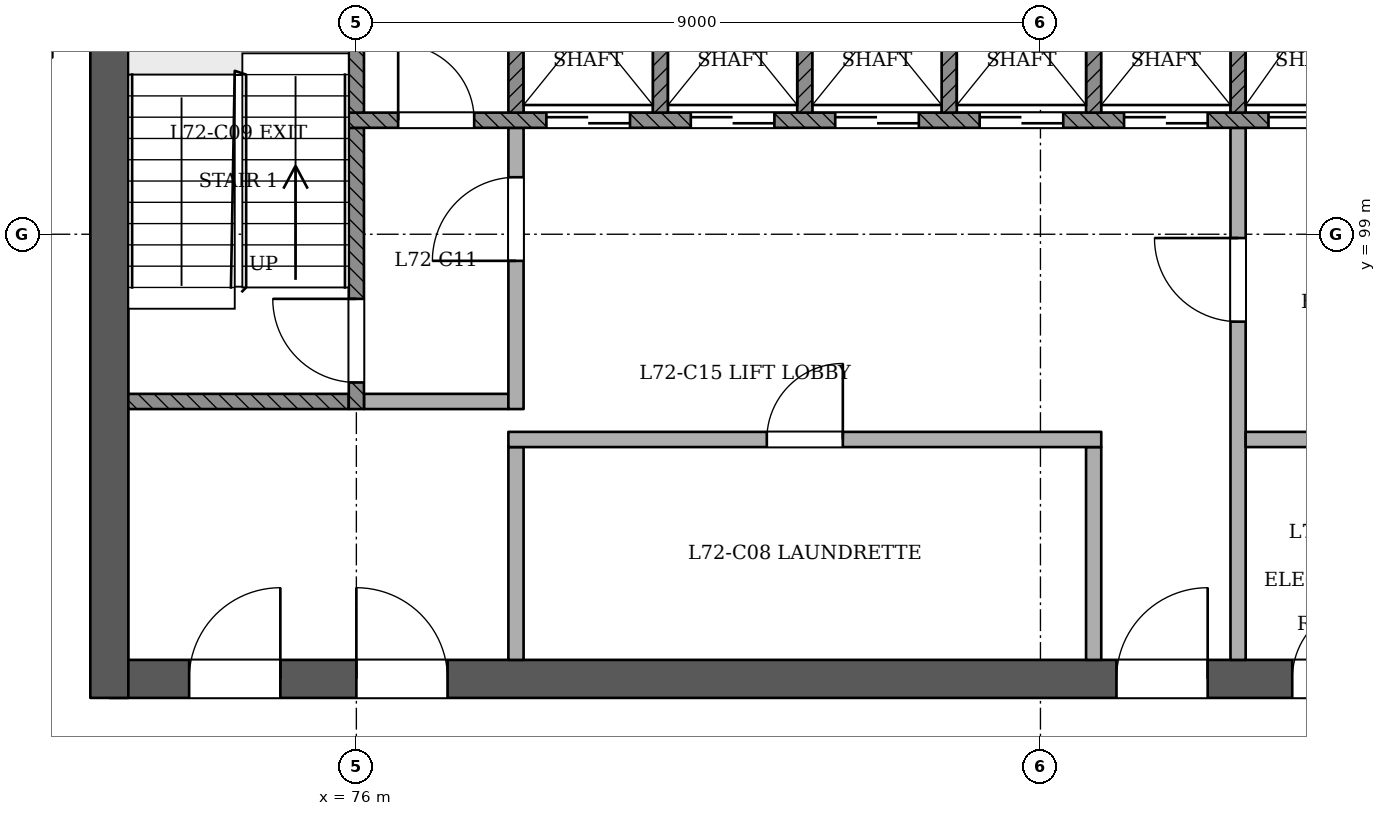
"""IFC4 building model, lengths in metres.
Left out: names, types, materials, properties, quantities, classifications, styles, units other than length and angle.
Written with IfcOpenShell. Run it as: python <this file> out.ifc"""

import sys

from ifc_helpers import new_model, si_unit, direction, frame, frame_2d, origin, place, context, subcontext, project, spatial, rectangle, extrude, element, fill, save


model = new_model("IFC4")
c1 = context("Model", 3, precision=1e-05, world=origin(), true_north=direction((0.0, 1.0)))
c2 = subcontext(c1, "Body", "Model", "MODEL_VIEW")
j1 = project(units=[si_unit("LENGTHUNIT", "METRE"), si_unit("PLANEANGLEUNIT", "RADIAN")], contexts=[c1])
p1 = place(None, origin())
s1 = spatial("IfcSite", under=j1, at=p1, CompositionType="ELEMENT")
p2 = place(p1, origin())
s2 = spatial("IfcBuilding", under=s1, at=p2, CompositionType="ELEMENT")
p3 = place(p2, frame((0.0, 0.0, 278.8)))
s3 = spatial("IfcBuildingStorey", under=s2, at=p3, CompositionType="ELEMENT", Elevation=278.8)
p4 = place(p3, frame((72.75, 93.15, 0.0), z_axis=(0.0, 0.0, 1.0), x_axis=(1.0, 0.0, 0.0)))
e1 = element("IfcWall", 1, at=p4, inside=s3, PredefinedType="SHEAR", context=c2, shape_type="SweptSolid", body=[
    extrude(rectangle(XDim=24.75, YDim=0.5, at=frame_2d((12.375, 0.0))), origin(), (0.0, 0.0, 1.0), 3.6),
])
p5 = place(p4, frame((1.05, 0.0, 0.0)))
e2 = element("IfcOpeningElement", 2, at=p5, cuts=e1, PredefinedType="OPENING", context=c2, shape_type="SweptSolid", body=[
    extrude(rectangle(XDim=1.2, YDim=2.1, at=frame_2d((0.6, 1.05))), frame((0.0, 0.26, 0.0), z_axis=(0.0, -1.0, 0.0), x_axis=(1.0, 0.0, 0.0)), (0.0, 0.0, 1.0), 0.521),
])
p6 = place(p4, frame((3.25, 0.0, 0.0)))
e3 = element("IfcOpeningElement", 3, at=p6, cuts=e1, PredefinedType="OPENING", context=c2, shape_type="SweptSolid", body=[
    extrude(rectangle(XDim=1.2, YDim=2.1, at=frame_2d((0.6, 1.05))), frame((0.0, 0.26, 0.0), z_axis=(0.0, -1.0, 0.0), x_axis=(1.0, 0.0, 0.0)), (0.0, 0.0, 1.0), 0.521),
])
p7 = place(p4, frame((13.25, 0.0, 0.0)))
e4 = element("IfcOpeningElement", 4, at=p7, cuts=e1, PredefinedType="OPENING", context=c2, shape_type="SweptSolid", body=[
    extrude(rectangle(XDim=1.2, YDim=2.1, at=frame_2d((0.6, 1.05))), frame((0.0, 0.26, 0.0), z_axis=(0.0, -1.0, 0.0), x_axis=(1.0, 0.0, 0.0)), (0.0, 0.0, 1.0), 0.521),
])
p8 = place(p4, frame((15.562, 0.0, 0.0)))
e5 = element("IfcOpeningElement", 5, at=p8, cuts=e1, PredefinedType="OPENING", context=c2, shape_type="SweptSolid", body=[
    extrude(rectangle(XDim=1.0, YDim=2.1, at=frame_2d((0.5, 1.05))), frame((0.0, 0.26, 0.0), z_axis=(0.0, -1.0, 0.0), x_axis=(1.0, 0.0, 0.0)), (0.0, 0.0, 1.0), 0.521),
])
p9 = place(p4, frame((19.0, 0.0, 0.0)))
e6 = element("IfcOpeningElement", 6, at=p9, cuts=e1, PredefinedType="OPENING", context=c2, shape_type="SweptSolid", body=[
    extrude(rectangle(XDim=1.0, YDim=2.1, at=frame_2d((0.5, 1.05))), frame((0.0, 0.26, 0.0), z_axis=(0.0, -1.0, 0.0), x_axis=(1.0, 0.0, 0.0)), (0.0, 0.0, 1.0), 0.521),
])
p10 = place(p4, frame((22.538, 0.0, 0.0)))
e7 = element("IfcOpeningElement", 7, at=p10, cuts=e1, PredefinedType="OPENING", context=c2, shape_type="SweptSolid", body=[
    extrude(rectangle(XDim=1.0, YDim=2.1, at=frame_2d((0.5, 1.05))), frame((0.0, 0.26, 0.0), z_axis=(0.0, -1.0, 0.0), x_axis=(1.0, 0.0, 0.0)), (0.0, 0.0, 1.0), 0.521),
])
p11 = place(p3, frame((72.75, 103.65, 0.0), z_axis=(0.0, 0.0, 1.0), x_axis=(0.0, -1.0, 0.0)))
e8 = element("IfcWall", 8, at=p11, inside=s3, PredefinedType="SHEAR", context=c2, shape_type="SweptSolid", body=[
    extrude(rectangle(XDim=10.75, YDim=0.5, at=frame_2d((5.375, 0.0))), origin(), (0.0, 0.0, 1.0), 3.6),
])
p12 = place(p3, frame((72.0, 101.4, 0.0), z_axis=(0.0, 0.0, 1.0), x_axis=(-1.0, 0.0, 0.0)))
e9 = element("IfcWall", 9, at=p12, inside=s3, PredefinedType="PARTITIONING", context=c2, shape_type="SweptSolid", body=[
    extrude(rectangle(XDim=1.8, YDim=0.15, at=frame_2d((0.9, 0.0))), origin(), (0.0, 0.0, 1.0), 3.2),
])
p13 = place(p12, frame((0.504, 0.0, 0.0)))
e10 = element("IfcOpeningElement", 10, at=p13, cuts=e9, PredefinedType="OPENING", context=c2, shape_type="SweptSolid", body=[
    extrude(rectangle(XDim=1.0, YDim=2.1, at=frame_2d((0.5, 1.05))), frame((0.0, 0.085, 0.0), z_axis=(0.0, -1.0, 0.0), x_axis=(1.0, 0.0, 0.0)), (0.0, 0.0, 1.0), 0.171),
])
for number, where, z_axis, x_axis in (
    (11, (78.1, 93.4, 0.0), (0.0, 0.0, 1.0), (0.0, 1.0, 0.0)),
    (12, (85.7, 93.4, 0.0), (0.0, 0.0, 1.0), (0.0, 1.0, 0.0)),
):
    element("IfcWall", number, at=place(p3, frame(where, z_axis=z_axis, x_axis=x_axis)), inside=s3, PredefinedType="PARTITIONING", context=c2, shape_type="SweptSolid", body=[
        extrude(rectangle(XDim=2.8, YDim=0.2, at=frame_2d((1.4, 0.0))), origin(), (0.0, 0.0, 1.0), 3.2),
    ])
p14 = place(p3, frame((87.6, 93.4, 0.0), z_axis=(0.0, 0.0, 1.0), x_axis=(0.0, 1.0, 0.0)))
e13 = element("IfcWall", 13, at=p14, inside=s3, PredefinedType="PARTITIONING", context=c2, shape_type="SweptSolid", body=[
    extrude(rectangle(XDim=7.0, YDim=0.2, at=frame_2d((3.5, 0.0))), origin(), (0.0, 0.0, 1.0), 3.2),
])
p15 = place(p14, frame((4.45, 0.0, 0.0)))
e14 = element("IfcOpeningElement", 14, at=p15, cuts=e13, PredefinedType="OPENING", context=c2, shape_type="SweptSolid", body=[
    extrude(rectangle(XDim=1.1, YDim=2.1, at=frame_2d((0.55, 1.05))), frame((0.0, 0.11, 0.0), z_axis=(0.0, -1.0, 0.0), x_axis=(1.0, 0.0, 0.0)), (0.0, 0.0, 1.0), 0.221),
])
p16 = place(p3, frame((78.0, 96.3, 0.0), z_axis=(0.0, 0.0, 1.0), x_axis=(1.0, 0.0, 0.0)))
e15 = element("IfcWall", 15, at=p16, inside=s3, PredefinedType="PARTITIONING", context=c2, shape_type="SweptSolid", body=[
    extrude(rectangle(XDim=7.8, YDim=0.2, at=frame_2d((3.9, 0.0))), origin(), (0.0, 0.0, 1.0), 3.2),
])
p17 = place(p16, frame((3.4, 0.0, 0.0)))
e16 = element("IfcOpeningElement", 16, at=p17, cuts=e15, PredefinedType="OPENING", context=c2, shape_type="SweptSolid", body=[
    extrude(rectangle(XDim=1.0, YDim=2.1, at=frame_2d((0.5, 1.05))), frame((0.0, 0.11, 0.0), z_axis=(0.0, -1.0, 0.0), x_axis=(1.0, 0.0, 0.0)), (0.0, 0.0, 1.0), 0.221),
])
p18 = place(p3, frame((87.7, 96.3, 0.0), z_axis=(0.0, 0.0, 1.0), x_axis=(1.0, 0.0, 0.0)))
e17 = element("IfcWall", 17, at=p18, inside=s3, PredefinedType="PARTITIONING", context=c2, shape_type="SweptSolid", body=[
    extrude(rectangle(XDim=3.6, YDim=0.2, at=frame_2d((1.8, 0.0))), origin(), (0.0, 0.0, 1.0), 3.2),
])
p19 = place(p3, frame((73.0, 96.8, 0.0), z_axis=(0.0, 0.0, 1.0), x_axis=(1.0, 0.0, 0.0)))
e18 = element("IfcWall", 18, at=p19, inside=s3, PredefinedType="SOLIDWALL", context=c2, shape_type="SweptSolid", body=[
    extrude(rectangle(XDim=2.9, YDim=0.2, at=frame_2d((1.45, 0.0))), origin(), (0.0, 0.0, 1.0), 3.2),
])
p20 = place(p3, frame((76.0, 96.7, 0.0), z_axis=(0.0, 0.0, 1.0), x_axis=(0.0, 1.0, 0.0)))
e19 = element("IfcWall", 19, at=p20, inside=s3, PredefinedType="SOLIDWALL", context=c2, shape_type="SweptSolid", body=[
    extrude(rectangle(XDim=3.7, YDim=0.2, at=frame_2d((1.85, 0.0))), origin(), (0.0, 0.0, 1.0), 3.2),
])
p21 = place(p20, frame((0.35, 0.0, 0.0)))
e20 = element("IfcOpeningElement", 20, at=p21, cuts=e19, PredefinedType="OPENING", context=c2, shape_type="SweptSolid", body=[
    extrude(rectangle(XDim=1.1, YDim=2.1, at=frame_2d((0.55, 1.05))), frame((0.0, 0.11, 0.0), z_axis=(0.0, -1.0, 0.0), x_axis=(1.0, 0.0, 0.0)), (0.0, 0.0, 1.0), 0.221),
])
p22 = place(p3, frame((76.1, 96.8, 0.0), z_axis=(0.0, 0.0, 1.0), x_axis=(1.0, 0.0, 0.0)))
e21 = element("IfcWall", 21, at=p22, inside=s3, PredefinedType="PARTITIONING", context=c2, shape_type="SweptSolid", body=[
    extrude(rectangle(XDim=1.9, YDim=0.2, at=frame_2d((0.95, 0.0))), origin(), (0.0, 0.0, 1.0), 3.2),
])
p23 = place(p3, frame((78.1, 96.7, 0.0), z_axis=(0.0, 0.0, 1.0), x_axis=(0.0, 1.0, 0.0)))
e22 = element("IfcWall", 22, at=p23, inside=s3, PredefinedType="PARTITIONING", context=c2, shape_type="SweptSolid", body=[
    extrude(rectangle(XDim=3.7, YDim=0.2, at=frame_2d((1.85, 0.0))), origin(), (0.0, 0.0, 1.0), 3.2),
])
p24 = place(p23, frame((1.95, 0.0, 0.0)))
e23 = element("IfcOpeningElement", 23, at=p24, cuts=e22, PredefinedType="OPENING", context=c2, shape_type="SweptSolid", body=[
    extrude(rectangle(XDim=1.1, YDim=2.1, at=frame_2d((0.55, 1.05))), frame((0.0, 0.11, 0.0), z_axis=(0.0, -1.0, 0.0), x_axis=(1.0, 0.0, 0.0)), (0.0, 0.0, 1.0), 0.221),
])
p25 = place(p3, frame((75.9, 100.5, 0.0), z_axis=(0.0, 0.0, 1.0), x_axis=(1.0, 0.0, 0.0)))
e24 = element("IfcWall", 24, at=p25, inside=s3, PredefinedType="SOLIDWALL", context=c2, shape_type="SweptSolid", body=[
    extrude(rectangle(XDim=18.2, YDim=0.2, at=frame_2d((9.1, 0.0))), origin(), (0.0, 0.0, 1.0), 3.2),
])
p26 = place(p25, frame((2.6, 0.0, 0.0)))
e25 = element("IfcOpeningElement", 25, at=p26, cuts=e24, PredefinedType="OPENING", context=c2, shape_type="SweptSolid", body=[
    extrude(rectangle(XDim=1.1, YDim=2.1, at=frame_2d((0.55, 1.05))), frame((0.0, 0.11, 0.0), z_axis=(0.0, -1.0, 0.0), x_axis=(1.0, 0.0, 0.0)), (0.0, 0.0, 1.0), 0.221),
])
p27 = place(p25, frame((4.5, 0.0, 0.0)))
e26 = element("IfcOpeningElement", 26, at=p27, cuts=e24, PredefinedType="OPENING", context=c2, shape_type="SweptSolid", body=[
    extrude(rectangle(XDim=1.1, YDim=2.1, at=frame_2d((0.55, 1.05))), frame((0.0, 0.11, 0.0), z_axis=(0.0, -1.0, 0.0), x_axis=(1.0, 0.0, 0.0)), (0.0, 0.0, 1.0), 0.221),
])
p28 = place(p25, frame((6.4, 0.0, 0.0)))
e27 = element("IfcOpeningElement", 27, at=p28, cuts=e24, PredefinedType="OPENING", context=c2, shape_type="SweptSolid", body=[
    extrude(rectangle(XDim=1.1, YDim=2.1, at=frame_2d((0.55, 1.05))), frame((0.0, 0.11, 0.0), z_axis=(0.0, -1.0, 0.0), x_axis=(1.0, 0.0, 0.0)), (0.0, 0.0, 1.0), 0.221),
])
p29 = place(p25, frame((8.3, 0.0, 0.0)))
e28 = element("IfcOpeningElement", 28, at=p29, cuts=e24, PredefinedType="OPENING", context=c2, shape_type="SweptSolid", body=[
    extrude(rectangle(XDim=1.1, YDim=2.1, at=frame_2d((0.55, 1.05))), frame((0.0, 0.11, 0.0), z_axis=(0.0, -1.0, 0.0), x_axis=(1.0, 0.0, 0.0)), (0.0, 0.0, 1.0), 0.221),
])
p30 = place(p25, frame((10.2, 0.0, 0.0)))
e29 = element("IfcOpeningElement", 29, at=p30, cuts=e24, PredefinedType="OPENING", context=c2, shape_type="SweptSolid", body=[
    extrude(rectangle(XDim=1.1, YDim=2.1, at=frame_2d((0.55, 1.05))), frame((0.0, 0.11, 0.0), z_axis=(0.0, -1.0, 0.0), x_axis=(1.0, 0.0, 0.0)), (0.0, 0.0, 1.0), 0.221),
])
p31 = place(p25, frame((12.1, 0.0, 0.0)))
e30 = element("IfcOpeningElement", 30, at=p31, cuts=e24, PredefinedType="OPENING", context=c2, shape_type="SweptSolid", body=[
    extrude(rectangle(XDim=1.1, YDim=2.1, at=frame_2d((0.55, 1.05))), frame((0.0, 0.11, 0.0), z_axis=(0.0, -1.0, 0.0), x_axis=(1.0, 0.0, 0.0)), (0.0, 0.0, 1.0), 0.221),
])
p32 = place(p25, frame((14.0, 0.0, 0.0)))
e31 = element("IfcOpeningElement", 31, at=p32, cuts=e24, PredefinedType="OPENING", context=c2, shape_type="SweptSolid", body=[
    extrude(rectangle(XDim=1.1, YDim=2.1, at=frame_2d((0.55, 1.05))), frame((0.0, 0.11, 0.0), z_axis=(0.0, -1.0, 0.0), x_axis=(1.0, 0.0, 0.0)), (0.0, 0.0, 1.0), 0.221),
])
p33 = place(p25, frame((0.65, 0.0, 0.0)))
e32 = element("IfcOpeningElement", 32, at=p33, cuts=e24, PredefinedType="OPENING", context=c2, shape_type="SweptSolid", body=[
    extrude(rectangle(XDim=1.0, YDim=2.1, at=frame_2d((0.5, 1.05))), frame((0.0, 0.11, 0.0), z_axis=(0.0, -1.0, 0.0), x_axis=(1.0, 0.0, 0.0)), (0.0, 0.0, 1.0), 0.221),
])
p34 = place(p25, frame((16.3, 0.0, 0.0)))
e33 = element("IfcOpeningElement", 33, at=p34, cuts=e24, PredefinedType="OPENING", context=c2, shape_type="SweptSolid", body=[
    extrude(rectangle(XDim=1.0, YDim=2.1, at=frame_2d((0.5, 1.05))), frame((0.0, 0.11, 0.0), z_axis=(0.0, -1.0, 0.0), x_axis=(1.0, 0.0, 0.0)), (0.0, 0.0, 1.0), 0.221),
])
for number, where, z_axis, x_axis in (
    (34, (76.0, 100.6, 0.0), (0.0, 0.0, 1.0), (0.0, 1.0, 0.0)),
    (35, (78.1, 100.6, 0.0), (0.0, 0.0, 1.0), (0.0, 1.0, 0.0)),
    (36, (80.0, 100.6, 0.0), (0.0, 0.0, 1.0), (0.0, 1.0, 0.0)),
    (37, (81.9, 100.6, 0.0), (0.0, 0.0, 1.0), (0.0, 1.0, 0.0)),
    (38, (83.8, 100.6, 0.0), (0.0, 0.0, 1.0), (0.0, 1.0, 0.0)),
    (39, (85.7, 100.6, 0.0), (0.0, 0.0, 1.0), (0.0, 1.0, 0.0)),
    (40, (87.6, 100.6, 0.0), (0.0, 0.0, 1.0), (0.0, 1.0, 0.0)),
):
    element("IfcWall", number, at=place(p3, frame(where, z_axis=z_axis, x_axis=x_axis)), inside=s3, PredefinedType="SOLIDWALL", context=c2, shape_type="SweptSolid", body=[
        extrude(rectangle(XDim=2.8, YDim=0.2, at=frame_2d((1.4, 0.0))), origin(), (0.0, 0.0, 1.0), 3.2),
    ])
p35 = place(p26, origin())
e41 = element("IfcDoor", 41, at=p35, inside=s3, OperationType="SLIDING_TO_RIGHT", PredefinedType="NOTDEFINED", context=c2, shape_type="SweptSolid", body=[
    extrude(rectangle(XDim=1.1, YDim=2.1, at=frame_2d((0.55, 1.05))), frame((0.0, 0.025, 0.0), z_axis=(0.0, -1.0, 0.0), x_axis=(1.0, 0.0, 0.0)), (0.0, 0.0, 1.0), 0.05),
])
fill(e25, e41)
p36 = place(p27, origin())
e42 = element("IfcDoor", 42, at=p36, inside=s3, OperationType="SLIDING_TO_LEFT", PredefinedType="NOTDEFINED", context=c2, shape_type="SweptSolid", body=[
    extrude(rectangle(XDim=1.1, YDim=2.1, at=frame_2d((0.55, 1.05))), frame((0.0, 0.025, 0.0), z_axis=(0.0, -1.0, 0.0), x_axis=(1.0, 0.0, 0.0)), (0.0, 0.0, 1.0), 0.05),
])
fill(e26, e42)
p37 = place(p28, origin())
e43 = element("IfcDoor", 43, at=p37, inside=s3, OperationType="SLIDING_TO_RIGHT", PredefinedType="NOTDEFINED", context=c2, shape_type="SweptSolid", body=[
    extrude(rectangle(XDim=1.1, YDim=2.1, at=frame_2d((0.55, 1.05))), frame((0.0, 0.025, 0.0), z_axis=(0.0, -1.0, 0.0), x_axis=(1.0, 0.0, 0.0)), (0.0, 0.0, 1.0), 0.05),
])
fill(e27, e43)
p38 = place(p29, origin())
e44 = element("IfcDoor", 44, at=p38, inside=s3, OperationType="SLIDING_TO_LEFT", PredefinedType="NOTDEFINED", context=c2, shape_type="SweptSolid", body=[
    extrude(rectangle(XDim=1.1, YDim=2.1, at=frame_2d((0.55, 1.05))), frame((0.0, 0.025, 0.0), z_axis=(0.0, -1.0, 0.0), x_axis=(1.0, 0.0, 0.0)), (0.0, 0.0, 1.0), 0.05),
])
fill(e28, e44)
p39 = place(p30, origin())
e45 = element("IfcDoor", 45, at=p39, inside=s3, OperationType="SLIDING_TO_RIGHT", PredefinedType="NOTDEFINED", context=c2, shape_type="SweptSolid", body=[
    extrude(rectangle(XDim=1.1, YDim=2.1, at=frame_2d((0.55, 1.05))), frame((0.0, 0.025, 0.0), z_axis=(0.0, -1.0, 0.0), x_axis=(1.0, 0.0, 0.0)), (0.0, 0.0, 1.0), 0.05),
])
fill(e29, e45)
p40 = place(p31, origin())
e46 = element("IfcDoor", 46, at=p40, inside=s3, OperationType="SLIDING_TO_RIGHT", PredefinedType="NOTDEFINED", context=c2, shape_type="SweptSolid", body=[
    extrude(rectangle(XDim=1.1, YDim=2.1, at=frame_2d((0.55, 1.05))), frame((0.0, 0.025, 0.0), z_axis=(0.0, -1.0, 0.0), x_axis=(1.0, 0.0, 0.0)), (0.0, 0.0, 1.0), 0.05),
])
fill(e30, e46)
p41 = place(p21, origin())
e47 = element("IfcDoor", 47, at=p41, inside=s3, OperationType="SINGLE_SWING_RIGHT", PredefinedType="NOTDEFINED", context=c2, shape_type="SweptSolid", body=[
    extrude(rectangle(XDim=1.1, YDim=2.1, at=frame_2d((0.55, 1.05))), frame((0.0, 0.025, 0.0), z_axis=(0.0, -1.0, 0.0), x_axis=(1.0, 0.0, 0.0)), (0.0, 0.0, 1.0), 0.05),
])
fill(e20, e47)
p42 = place(p24, origin())
e48 = element("IfcDoor", 48, at=p42, inside=s3, OperationType="SINGLE_SWING_LEFT", PredefinedType="NOTDEFINED", context=c2, shape_type="SweptSolid", body=[
    extrude(rectangle(XDim=1.1, YDim=2.1, at=frame_2d((0.55, 1.05))), frame((0.0, 0.025, 0.0), z_axis=(0.0, -1.0, 0.0), x_axis=(1.0, 0.0, 0.0)), (0.0, 0.0, 1.0), 0.05),
])
fill(e23, e48)
p43 = place(p15, origin())
e49 = element("IfcDoor", 49, at=p43, inside=s3, OperationType="SINGLE_SWING_RIGHT", PredefinedType="NOTDEFINED", context=c2, shape_type="SweptSolid", body=[
    extrude(rectangle(XDim=1.1, YDim=2.1, at=frame_2d((0.55, 1.05))), frame((0.0, 0.025, 0.0), z_axis=(0.0, -1.0, 0.0), x_axis=(1.0, 0.0, 0.0)), (0.0, 0.0, 1.0), 0.05),
])
fill(e14, e49)
p44 = place(p5, origin())
e50 = element("IfcDoor", 50, at=p44, inside=s3, OperationType="SINGLE_SWING_RIGHT", PredefinedType="NOTDEFINED", context=c2, shape_type="SweptSolid", body=[
    extrude(rectangle(XDim=1.2, YDim=2.1, at=frame_2d((0.6, 1.05))), frame((0.0, 0.025, 0.0), z_axis=(0.0, -1.0, 0.0), x_axis=(1.0, 0.0, 0.0)), (0.0, 0.0, 1.0), 0.05),
])
fill(e2, e50)
p45 = place(p6, origin())
e51 = element("IfcDoor", 51, at=p45, inside=s3, OperationType="SINGLE_SWING_LEFT", PredefinedType="NOTDEFINED", context=c2, shape_type="SweptSolid", body=[
    extrude(rectangle(XDim=1.2, YDim=2.1, at=frame_2d((0.6, 1.05))), frame((0.0, 0.025, 0.0), z_axis=(0.0, -1.0, 0.0), x_axis=(1.0, 0.0, 0.0)), (0.0, 0.0, 1.0), 0.05),
])
fill(e3, e51)
p46 = place(p7, origin())
e52 = element("IfcDoor", 52, at=p46, inside=s3, OperationType="SINGLE_SWING_RIGHT", PredefinedType="NOTDEFINED", context=c2, shape_type="SweptSolid", body=[
    extrude(rectangle(XDim=1.2, YDim=2.1, at=frame_2d((0.6, 1.05))), frame((0.0, 0.025, 0.0), z_axis=(0.0, -1.0, 0.0), x_axis=(1.0, 0.0, 0.0)), (0.0, 0.0, 1.0), 0.05),
])
fill(e4, e52)
p47 = place(p33, origin())
e53 = element("IfcDoor", 53, at=p47, inside=s3, OperationType="SINGLE_SWING_LEFT", PredefinedType="NOTDEFINED", context=c2, shape_type="SweptSolid", body=[
    extrude(rectangle(XDim=1.0, YDim=2.1, at=frame_2d((0.5, 1.05))), frame((0.0, 0.025, 0.0), z_axis=(0.0, -1.0, 0.0), x_axis=(1.0, 0.0, 0.0)), (0.0, 0.0, 1.0), 0.05),
])
fill(e32, e53)
p48 = place(p8, origin())
e54 = element("IfcDoor", 54, at=p48, inside=s3, OperationType="SINGLE_SWING_RIGHT", PredefinedType="NOTDEFINED", context=c2, shape_type="SweptSolid", body=[
    extrude(rectangle(XDim=1.0, YDim=2.1, at=frame_2d((0.5, 1.05))), frame((0.0, 0.025, 0.0), z_axis=(0.0, -1.0, 0.0), x_axis=(1.0, 0.0, 0.0)), (0.0, 0.0, 1.0), 0.05),
])
fill(e5, e54)
p49 = place(p17, origin())
e55 = element("IfcDoor", 55, at=p49, inside=s3, OperationType="SINGLE_SWING_RIGHT", PredefinedType="NOTDEFINED", context=c2, shape_type="SweptSolid", body=[
    extrude(rectangle(XDim=1.0, YDim=2.1, at=frame_2d((0.5, 1.05))), frame((0.0, 0.025, 0.0), z_axis=(0.0, -1.0, 0.0), x_axis=(1.0, 0.0, 0.0)), (0.0, 0.0, 1.0), 0.05),
])
fill(e16, e55)
save(model, sys.argv[1])
